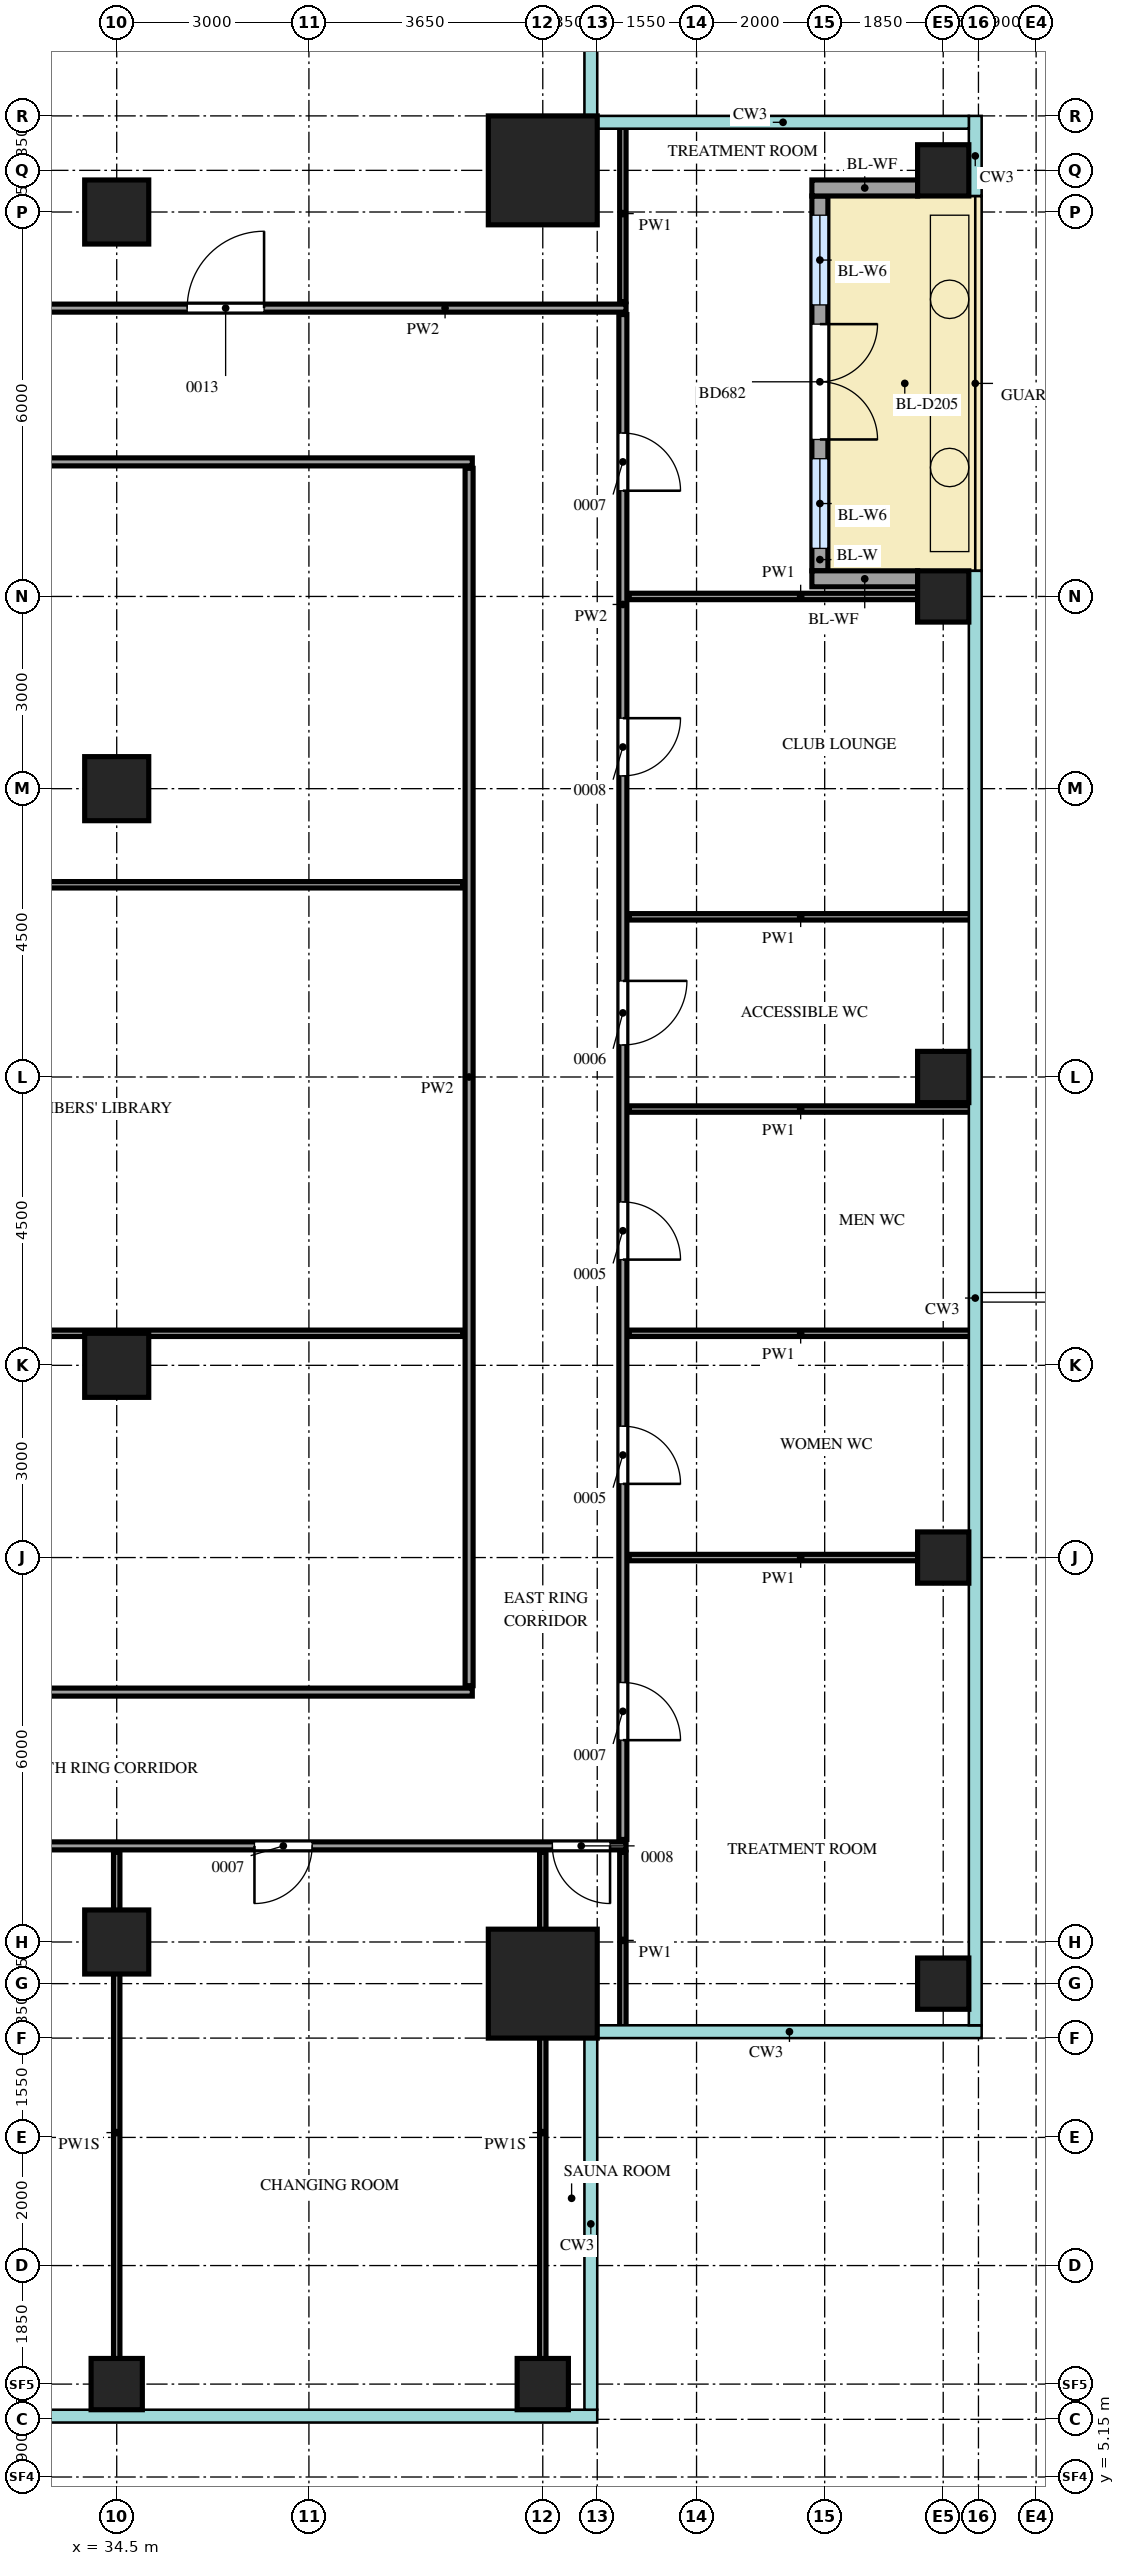
"""IFC4 building model, lengths in metres.
Left out: names, types, materials, properties, quantities, classifications, styles, units other than length and angle.
Written with IfcOpenShell. Run it as: python <this file> out.ifc"""

import sys

from ifc_helpers import new_model, si_unit, direction, frame, frame_2d, origin, origin_2d, place, context, subcontext, project, spatial, rectangle, extrude, source, transform, mapped, element, fill, save


model = new_model("IFC4")
c1 = context("Model", 3, precision=1e-05, world=origin(), true_north=direction((0.0, 1.0)))
c2 = subcontext(c1, "Body", "Model", "MODEL_VIEW")
j1 = project(units=[si_unit("LENGTHUNIT", "METRE"), si_unit("PLANEANGLEUNIT", "RADIAN")], contexts=[c1])
p1 = place(None, origin())
s1 = spatial("IfcSite", under=j1, at=p1, CompositionType="ELEMENT")
p2 = place(p1, origin())
s2 = spatial("IfcBuilding", under=s1, at=p2, CompositionType="ELEMENT")
p3 = place(p2, frame((0.0, 0.0, 302.2)))
s3 = spatial("IfcBuildingStorey", under=s2, at=p3, CompositionType="ELEMENT", Elevation=302.2)
m1 = source(origin(), c2, "Body", "SweptSolid", [
    extrude(rectangle(XDim=1.7, YDim=1.7, at=origin_2d()), origin(), (0.0, 0.0, 1.0), 3.75),
])
for number, where, z_axis, x_axis in (
    (1, (41.15, 41.15, 0.0), (0.0, 0.0, 1.0), (1.0, 0.0, 0.0)),
    (2, (41.15, 12.85, 0.0), (0.0, 0.0, 1.0), (1.0, 0.0, 0.0)),
):
    element("IfcColumn", number, at=place(p3, frame(where, z_axis=z_axis, x_axis=x_axis)), inside=s3, PredefinedType="COLUMN", context=c2, shape_type="MappedRepresentation", body=[
        mapped(m1, transform((0.0, 0.0, 0.0))),
    ])
m2 = source(origin(), c2, "Body", "SweptSolid", [
    extrude(rectangle(XDim=0.8, YDim=0.8, at=origin_2d()), origin(), (0.0, 0.0, 1.0), 3.75),
])
for number, where, z_axis, x_axis in (
    (3, (34.5, 6.6, 0.0), (0.0, 0.0, 1.0), (1.0, 0.0, 0.0)),
    (4, (41.15, 6.6, 0.0), (0.0, 0.0, 1.0), (1.0, 0.0, 0.0)),
    (5, (47.4, 12.85, 0.0), (0.0, 0.0, 1.0), (1.0, 0.0, 0.0)),
    (6, (47.4, 19.5, 0.0), (0.0, 0.0, 1.0), (1.0, 0.0, 0.0)),
    (7, (47.4, 27.0, 0.0), (0.0, 0.0, 1.0), (1.0, 0.0, 0.0)),
    (8, (47.4, 34.5, 0.0), (0.0, 0.0, 1.0), (1.0, 0.0, 0.0)),
    (9, (47.4, 41.15, 0.0), (0.0, 0.0, 1.0), (1.0, 0.0, 0.0)),
):
    element("IfcColumn", number, at=place(p3, frame(where, z_axis=z_axis, x_axis=x_axis)), inside=s3, PredefinedType="COLUMN", context=c2, shape_type="MappedRepresentation", body=[
        mapped(m2, transform((0.0, 0.0, 0.0))),
    ])
m3 = source(origin(), c2, "Body", "SweptSolid", [
    extrude(rectangle(XDim=1.0, YDim=1.0, at=origin_2d()), origin(), (0.0, 0.0, 1.0), 3.75),
])
for number, where, z_axis, x_axis in (
    (10, (34.5, 13.5, 0.0), (0.0, 0.0, 1.0), (1.0, 0.0, 0.0)),
    (11, (34.5, 22.5, 0.0), (0.0, 0.0, 1.0), (1.0, 0.0, 0.0)),
    (12, (34.5, 31.5, 0.0), (0.0, 0.0, 1.0), (1.0, 0.0, 0.0)),
    (13, (34.5, 40.5, 0.0), (0.0, 0.0, 1.0), (1.0, 0.0, 0.0)),
):
    element("IfcColumn", number, at=place(p3, frame(where, z_axis=z_axis, x_axis=x_axis)), inside=s3, PredefinedType="COLUMN", context=c2, shape_type="MappedRepresentation", body=[
        mapped(m3, transform((0.0, 0.0, 0.0))),
    ])
m4 = source(origin(), c2, "Body", "SweptSolid", [
    extrude(rectangle(XDim=5.85, YDim=0.25, at=frame_2d((2.925, 0.0))), origin(), (0.0, 0.0, 1.0), 3.75),
])
p4 = place(p3, frame((45.475, 34.9, 0.0), z_axis=(0.0, 0.0, 1.0), x_axis=(0.0, 1.0, 0.0)))
e14 = element("IfcWall", 14, at=p4, inside=s3, PredefinedType="SOLIDWALL", context=c2, shape_type="MappedRepresentation", body=[
    mapped(m4, transform((0.0, 0.0, 0.0))),
])
m5 = source(origin(), c2, "Body", "SweptSolid", [
    extrude(rectangle(XDim=1.4, YDim=2.4, at=frame_2d((0.7, 1.2))), frame((0.0, 0.135, 0.0), z_axis=(0.0, -1.0, 0.0), x_axis=(1.0, 0.0, 0.0)), (0.0, 0.0, 1.0), 0.27),
])
p5 = place(p4, frame((0.35, 0.0, 0.0)))
e15 = element("IfcOpeningElement", 15, at=p5, cuts=e14, PredefinedType="OPENING", context=c2, shape_type="MappedRepresentation", body=[
    mapped(m5, transform((0.0, 0.0, 0.0))),
])
p6 = place(p4, frame((4.15, 0.0, 0.0)))
e16 = element("IfcOpeningElement", 16, at=p6, cuts=e14, PredefinedType="OPENING", context=c2, shape_type="MappedRepresentation", body=[
    mapped(m5, transform((0.0, 0.0, 0.0))),
])
m6 = source(origin(), c2, "Body", "SweptSolid", [
    extrude(rectangle(XDim=1.8, YDim=2.4, at=frame_2d((0.9, 1.2))), frame((0.0, 0.135, 0.0), z_axis=(0.0, -1.0, 0.0), x_axis=(1.0, 0.0, 0.0)), (0.0, 0.0, 1.0), 0.27),
])
p7 = place(p4, frame((2.05, 0.0, 0.0)))
e17 = element("IfcOpeningElement", 17, at=p7, cuts=e14, PredefinedType="OPENING", context=c2, shape_type="MappedRepresentation", body=[
    mapped(m6, transform((0.0, 0.0, 0.0))),
])
m7 = source(origin(), c2, "Body", "SweptSolid", [
    extrude(rectangle(XDim=1.65, YDim=0.25, at=frame_2d((0.825, 0.0))), origin(), (0.0, 0.0, 1.0), 3.45),
])
for number, where, z_axis, x_axis in (
    (18, (47.0, 34.775, 0.0), (0.0, 0.0, 1.0), (-1.0, 0.0, 0.0)),
    (19, (47.0, 40.875, 0.0), (0.0, 0.0, 1.0), (-1.0, 0.0, 0.0)),
):
    element("IfcWall", number, at=place(p3, frame(where, z_axis=z_axis, x_axis=x_axis)), inside=s3, PredefinedType="SOLIDWALL", context=c2, shape_type="MappedRepresentation", body=[
        mapped(m7, transform((0.0, 0.0, 0.0))),
    ])
m8 = source(origin(), c2, "Body", "SweptSolid", [
    extrude(rectangle(XDim=8.75, YDim=0.1, at=frame_2d((4.375, 0.0))), origin(), (0.0, 0.0, 1.0), 3.35),
])
for number, where, z_axis, x_axis in (
    (20, (34.5, 6.15, 0.0), (0.0, 0.0, 1.0), (0.0, 1.0, 0.0)),
    (21, (41.15, 6.15, 0.0), (0.0, 0.0, 1.0), (0.0, 1.0, 0.0)),
):
    element("IfcWall", number, at=place(p3, frame(where, z_axis=z_axis, x_axis=x_axis)), inside=s3, PredefinedType="PARTITIONING", context=c2, shape_type="MappedRepresentation", body=[
        mapped(m8, transform((0.0, 0.0, 0.0))),
    ])
m9 = source(origin(), c2, "Body", "SweptSolid", [
    extrude(rectangle(XDim=2.75, YDim=0.1, at=frame_2d((1.375, 0.0))), origin(), (0.0, 0.0, 1.0), 3.8),
])
p8 = place(p3, frame((42.4, 12.15, 0.0), z_axis=(0.0, 0.0, 1.0), x_axis=(0.0, 1.0, 0.0)))
e22 = element("IfcWall", 22, at=p8, inside=s3, PredefinedType="PARTITIONING", context=c2, shape_type="MappedRepresentation", body=[
    mapped(m9, transform((0.0, 0.0, 0.0))),
])
m10 = source(origin(), c2, "Body", "SweptSolid", [
    extrude(rectangle(XDim=19.1, YDim=0.125, at=frame_2d((9.55, 0.0))), origin(), (0.0, 0.0, 1.0), 3.8),
])
p9 = place(p3, frame((23.35, 15.0, 0.0), z_axis=(0.0, 0.0, 1.0), x_axis=(1.0, 0.0, 0.0)))
e23 = element("IfcWall", 23, at=p9, inside=s3, PredefinedType="PARTITIONING", context=c2, shape_type="MappedRepresentation", body=[
    mapped(m10, transform((0.0, 0.0, 0.0))),
])
m11 = source(origin(), c2, "Body", "SweptSolid", [
    extrude(rectangle(XDim=0.9, YDim=2.1, at=frame_2d((0.45, 1.05))), frame((0.0, 0.073, 0.0), z_axis=(0.0, -1.0, 0.0), x_axis=(1.0, 0.0, 0.0)), (0.0, 0.0, 1.0), 0.145),
])
p10 = place(p9, frame((5.3, 0.0, 0.0)))
e24 = element("IfcOpeningElement", 24, at=p10, cuts=e23, PredefinedType="OPENING", context=c2, shape_type="MappedRepresentation", body=[
    mapped(m11, transform((0.0, 0.0, 0.0))),
])
p11 = place(p9, frame((13.3, 0.0, 0.0)))
e25 = element("IfcOpeningElement", 25, at=p11, cuts=e23, PredefinedType="OPENING", context=c2, shape_type="MappedRepresentation", body=[
    mapped(m11, transform((0.0, 0.0, 0.0))),
])
p12 = place(p9, frame((17.95, 0.0, 0.0)))
e26 = element("IfcOpeningElement", 26, at=p12, cuts=e23, PredefinedType="OPENING", context=c2, shape_type="MappedRepresentation", body=[
    mapped(m11, transform((0.0, 0.0, 0.0))),
])
m12 = source(origin(), c2, "Body", "SweptSolid", [
    extrude(rectangle(XDim=23.8, YDim=0.125, at=frame_2d((11.9, 0.0))), origin(), (0.0, 0.0, 1.0), 3.8),
])
p13 = place(p3, frame((42.4, 15.1, 0.0), z_axis=(0.0, 0.0, 1.0), x_axis=(0.0, 1.0, 0.0)))
e27 = element("IfcWall", 27, at=p13, inside=s3, PredefinedType="PARTITIONING", context=c2, shape_type="MappedRepresentation", body=[
    mapped(m12, transform((0.0, 0.0, 0.0))),
])
p14 = place(p13, frame((1.55, 0.0, 0.0)))
e28 = element("IfcOpeningElement", 28, at=p14, cuts=e27, PredefinedType="OPENING", context=c2, shape_type="MappedRepresentation", body=[
    mapped(m11, transform((0.0, 0.0, 0.0))),
])
p15 = place(p13, frame((5.55, 0.0, 0.0)))
e29 = element("IfcOpeningElement", 29, at=p15, cuts=e27, PredefinedType="OPENING", context=c2, shape_type="MappedRepresentation", body=[
    mapped(m11, transform((0.0, 0.0, 0.0))),
])
p16 = place(p13, frame((9.05, 0.0, 0.0)))
e30 = element("IfcOpeningElement", 30, at=p16, cuts=e27, PredefinedType="OPENING", context=c2, shape_type="MappedRepresentation", body=[
    mapped(m11, transform((0.0, 0.0, 0.0))),
])
m13 = source(origin(), c2, "Body", "SweptSolid", [
    extrude(rectangle(XDim=1.0, YDim=2.1, at=frame_2d((0.5, 1.05))), frame((0.0, 0.073, 0.0), z_axis=(0.0, -1.0, 0.0), x_axis=(1.0, 0.0, 0.0)), (0.0, 0.0, 1.0), 0.145),
])
p17 = place(p13, frame((12.4, 0.0, 0.0)))
e31 = element("IfcOpeningElement", 31, at=p17, cuts=e27, PredefinedType="OPENING", context=c2, shape_type="MappedRepresentation", body=[
    mapped(m13, transform((0.0, 0.0, 0.0))),
])
p18 = place(p13, frame((16.6, 0.0, 0.0)))
e32 = element("IfcOpeningElement", 32, at=p18, cuts=e27, PredefinedType="OPENING", context=c2, shape_type="MappedRepresentation", body=[
    mapped(m11, transform((0.0, 0.0, 0.0))),
])
p19 = place(p13, frame((21.05, 0.0, 0.0)))
e33 = element("IfcOpeningElement", 33, at=p19, cuts=e27, PredefinedType="OPENING", context=c2, shape_type="MappedRepresentation", body=[
    mapped(m11, transform((0.0, 0.0, 0.0))),
])
m14 = source(origin(), c2, "Body", "SweptSolid", [
    extrude(rectangle(XDim=16.7, YDim=0.125, at=frame_2d((8.35, 0.0))), origin(), (0.0, 0.0, 1.0), 3.8),
])
p20 = place(p3, frame((23.35, 17.4, 0.0), z_axis=(0.0, 0.0, 1.0), x_axis=(1.0, 0.0, 0.0)))
e34 = element("IfcWall", 34, at=p20, inside=s3, PredefinedType="PARTITIONING", context=c2, shape_type="MappedRepresentation", body=[
    mapped(m14, transform((0.0, 0.0, 0.0))),
])
p21 = place(p20, frame((8.05, 0.0, 0.0)))
e35 = element("IfcOpeningElement", 35, at=p21, cuts=e34, PredefinedType="OPENING", context=c2, shape_type="MappedRepresentation", body=[
    mapped(m11, transform((0.0, 0.0, 0.0))),
])
m15 = source(origin(), c2, "Body", "SweptSolid", [
    extrude(rectangle(XDim=19.0, YDim=0.125, at=frame_2d((9.5, 0.0))), origin(), (0.0, 0.0, 1.0), 3.8),
])
p22 = place(p3, frame((40.0, 17.5, 0.0), z_axis=(0.0, 0.0, 1.0), x_axis=(0.0, 1.0, 0.0)))
e36 = element("IfcWall", 36, at=p22, inside=s3, PredefinedType="PARTITIONING", context=c2, shape_type="MappedRepresentation", body=[
    mapped(m15, transform((0.0, 0.0, 0.0))),
])
m16 = source(origin(), c2, "Body", "SweptSolid", [
    extrude(rectangle(XDim=5.35, YDim=0.1, at=frame_2d((2.675, 0.0))), origin(), (0.0, 0.0, 1.0), 3.8),
])
p23 = place(p3, frame((42.5, 19.5, 0.0), z_axis=(0.0, 0.0, 1.0), x_axis=(1.0, 0.0, 0.0)))
e37 = element("IfcWall", 37, at=p23, inside=s3, PredefinedType="PARTITIONING", context=c2, shape_type="MappedRepresentation", body=[
    mapped(m16, transform((0.0, 0.0, 0.0))),
])
m17 = source(origin(), c2, "Body", "SweptSolid", [
    extrude(rectangle(XDim=16.4, YDim=0.1, at=frame_2d((8.2, 0.0))), origin(), (0.0, 0.0, 1.0), 3.8),
])
p24 = place(p3, frame((23.5, 23.0, 0.0), z_axis=(0.0, 0.0, 1.0), x_axis=(1.0, 0.0, 0.0)))
e38 = element("IfcWall", 38, at=p24, inside=s3, PredefinedType="PARTITIONING", context=c2, shape_type="MappedRepresentation", body=[
    mapped(m17, transform((0.0, 0.0, 0.0))),
])
for number, where, z_axis, x_axis in (
    (39, (42.5, 23.0, 0.0), (0.0, 0.0, 1.0), (1.0, 0.0, 0.0)),
    (40, (42.5, 26.5, 0.0), (0.0, 0.0, 1.0), (1.0, 0.0, 0.0)),
    (41, (42.5, 29.5, 0.0), (0.0, 0.0, 1.0), (1.0, 0.0, 0.0)),
):
    element("IfcWall", number, at=place(p3, frame(where, z_axis=z_axis, x_axis=x_axis)), inside=s3, PredefinedType="PARTITIONING", context=c2, shape_type="MappedRepresentation", body=[
        mapped(m16, transform((0.0, 0.0, 0.0))),
    ])
p25 = place(p3, frame((23.5, 30.0, 0.0), z_axis=(0.0, 0.0, 1.0), x_axis=(1.0, 0.0, 0.0)))
e42 = element("IfcWall", 42, at=p25, inside=s3, PredefinedType="PARTITIONING", context=c2, shape_type="MappedRepresentation", body=[
    mapped(m17, transform((0.0, 0.0, 0.0))),
])
p26 = place(p3, frame((42.5, 34.5, 0.0), z_axis=(0.0, 0.0, 1.0), x_axis=(1.0, 0.0, 0.0)))
e43 = element("IfcWall", 43, at=p26, inside=s3, PredefinedType="PARTITIONING", context=c2, shape_type="MappedRepresentation", body=[
    mapped(m16, transform((0.0, 0.0, 0.0))),
])
p27 = place(p3, frame((23.35, 36.6, 0.0), z_axis=(0.0, 0.0, 1.0), x_axis=(1.0, 0.0, 0.0)))
e44 = element("IfcWall", 44, at=p27, inside=s3, PredefinedType="PARTITIONING", context=c2, shape_type="MappedRepresentation", body=[
    mapped(m14, transform((0.0, 0.0, 0.0))),
])
p28 = place(p27, frame((8.05, 0.0, 0.0)))
e45 = element("IfcOpeningElement", 45, at=p28, cuts=e44, PredefinedType="OPENING", context=c2, shape_type="MappedRepresentation", body=[
    mapped(m11, transform((0.0, 0.0, 0.0))),
])
m18 = source(origin(), c2, "Body", "SweptSolid", [
    extrude(rectangle(XDim=12.1, YDim=0.125, at=frame_2d((6.05, 0.0))), origin(), (0.0, 0.0, 1.0), 3.8),
])
p29 = place(p3, frame((30.35, 39.0, 0.0), z_axis=(0.0, 0.0, 1.0), x_axis=(1.0, 0.0, 0.0)))
e46 = element("IfcWall", 46, at=p29, inside=s3, PredefinedType="PARTITIONING", context=c2, shape_type="MappedRepresentation", body=[
    mapped(m18, transform((0.0, 0.0, 0.0))),
])
m19 = source(origin(), c2, "Body", "SweptSolid", [
    extrude(rectangle(XDim=1.2, YDim=2.1, at=frame_2d((0.6, 1.05))), frame((0.0, 0.073, 0.0), z_axis=(0.0, -1.0, 0.0), x_axis=(1.0, 0.0, 0.0)), (0.0, 0.0, 1.0), 0.145),
])
p30 = place(p29, frame((5.25, 0.0, 0.0)))
e47 = element("IfcOpeningElement", 47, at=p30, cuts=e46, PredefinedType="OPENING", context=c2, shape_type="MappedRepresentation", body=[
    mapped(m19, transform((0.0, 0.0, 0.0))),
])
p31 = place(p3, frame((42.4, 39.1, 0.0), z_axis=(0.0, 0.0, 1.0), x_axis=(0.0, 1.0, 0.0)))
e48 = element("IfcWall", 48, at=p31, inside=s3, PredefinedType="PARTITIONING", context=c2, shape_type="MappedRepresentation", body=[
    mapped(m9, transform((0.0, 0.0, 0.0))),
])
m20 = source(origin(), c2, "Body", "SweptSolid", [
    extrude(rectangle(XDim=1.4, YDim=2.4, at=frame_2d((0.7, 1.2))), frame((0.0, 0.03, 0.0), z_axis=(0.0, -1.0, 0.0), x_axis=(1.0, 0.0, 0.0)), (0.0, 0.0, 1.0), 0.06),
])
p32 = place(p5, origin())
e49 = element("IfcWindow", 49, at=p32, inside=s3, PartitioningType="SINGLE_PANEL", PredefinedType="WINDOW", context=c2, shape_type="MappedRepresentation", body=[
    mapped(m20, transform((0.0, 0.0, 0.0))),
])
fill(e15, e49)
p33 = place(p6, origin())
e50 = element("IfcWindow", 50, at=p33, inside=s3, PartitioningType="SINGLE_PANEL", PredefinedType="WINDOW", context=c2, shape_type="MappedRepresentation", body=[
    mapped(m20, transform((0.0, 0.0, 0.0))),
])
fill(e16, e50)
m21 = source(origin(), c2, "Body", "SweptSolid", [
    extrude(rectangle(XDim=1.8, YDim=2.4, at=frame_2d((0.9, 1.2))), frame((0.0, 0.025, 0.0), z_axis=(0.0, -1.0, 0.0), x_axis=(1.0, 0.0, 0.0)), (0.0, 0.0, 1.0), 0.05),
])
p34 = place(p7, origin())
e51 = element("IfcDoor", 51, at=p34, inside=s3, OperationType="DOUBLE_DOOR_DOUBLE_SWING", PredefinedType="DOOR", context=c2, shape_type="MappedRepresentation", body=[
    mapped(m21, transform((0.0, 0.0, 0.0))),
])
fill(e17, e51)
m22 = source(origin(), c2, "Body", "SweptSolid", [
    extrude(rectangle(XDim=0.9, YDim=2.1, at=frame_2d((0.45, 1.05))), frame((0.0, 0.025, 0.0), z_axis=(0.0, -1.0, 0.0), x_axis=(1.0, 0.0, 0.0)), (0.0, 0.0, 1.0), 0.05),
])
p35 = place(p11, origin())
e52 = element("IfcDoor", 52, at=p35, inside=s3, OperationType="SINGLE_SWING_LEFT", PredefinedType="DOOR", context=c2, shape_type="MappedRepresentation", body=[
    mapped(m22, transform((0.0, 0.0, 0.0))),
])
fill(e25, e52)
p36 = place(p12, origin())
e53 = element("IfcDoor", 53, at=p36, inside=s3, OperationType="SINGLE_SWING_RIGHT", PredefinedType="DOOR", context=c2, shape_type="MappedRepresentation", body=[
    mapped(m22, transform((0.0, 0.0, 0.0))),
])
fill(e26, e53)
p37 = place(p14, origin())
e54 = element("IfcDoor", 54, at=p37, inside=s3, OperationType="SINGLE_SWING_LEFT", PredefinedType="DOOR", context=c2, shape_type="MappedRepresentation", body=[
    mapped(m22, transform((0.0, 0.0, 0.0))),
])
fill(e28, e54)
p38 = place(p15, origin())
e55 = element("IfcDoor", 55, at=p38, inside=s3, OperationType="SINGLE_SWING_LEFT", PredefinedType="DOOR", context=c2, shape_type="MappedRepresentation", body=[
    mapped(m22, transform((0.0, 0.0, 0.0))),
])
fill(e29, e55)
p39 = place(p16, origin())
e56 = element("IfcDoor", 56, at=p39, inside=s3, OperationType="SINGLE_SWING_LEFT", PredefinedType="DOOR", context=c2, shape_type="MappedRepresentation", body=[
    mapped(m22, transform((0.0, 0.0, 0.0))),
])
fill(e30, e56)
m23 = source(origin(), c2, "Body", "SweptSolid", [
    extrude(rectangle(XDim=1.0, YDim=2.1, at=frame_2d((0.5, 1.05))), frame((0.0, 0.025, 0.0), z_axis=(0.0, -1.0, 0.0), x_axis=(1.0, 0.0, 0.0)), (0.0, 0.0, 1.0), 0.05),
])
p40 = place(p17, origin())
e57 = element("IfcDoor", 57, at=p40, inside=s3, OperationType="SINGLE_SWING_RIGHT", PredefinedType="DOOR", context=c2, shape_type="MappedRepresentation", body=[
    mapped(m23, transform((0.0, 0.0, 0.0))),
])
fill(e31, e57)
p41 = place(p18, origin())
e58 = element("IfcDoor", 58, at=p41, inside=s3, OperationType="SINGLE_SWING_RIGHT", PredefinedType="DOOR", context=c2, shape_type="MappedRepresentation", body=[
    mapped(m22, transform((0.0, 0.0, 0.0))),
])
fill(e32, e58)
p42 = place(p19, origin())
e59 = element("IfcDoor", 59, at=p42, inside=s3, OperationType="SINGLE_SWING_LEFT", PredefinedType="DOOR", context=c2, shape_type="MappedRepresentation", body=[
    mapped(m22, transform((0.0, 0.0, 0.0))),
])
fill(e33, e59)
m24 = source(origin(), c2, "Body", "SweptSolid", [
    extrude(rectangle(XDim=1.2, YDim=2.1, at=frame_2d((0.6, 1.05))), frame((0.0, 0.025, 0.0), z_axis=(0.0, -1.0, 0.0), x_axis=(1.0, 0.0, 0.0)), (0.0, 0.0, 1.0), 0.05),
])
p43 = place(p30, origin())
e60 = element("IfcDoor", 60, at=p43, inside=s3, OperationType="SINGLE_SWING_LEFT", PredefinedType="DOOR", context=c2, shape_type="MappedRepresentation", body=[
    mapped(m24, transform((0.0, 0.0, 0.0))),
])
fill(e47, e60)
save(model, sys.argv[1])
